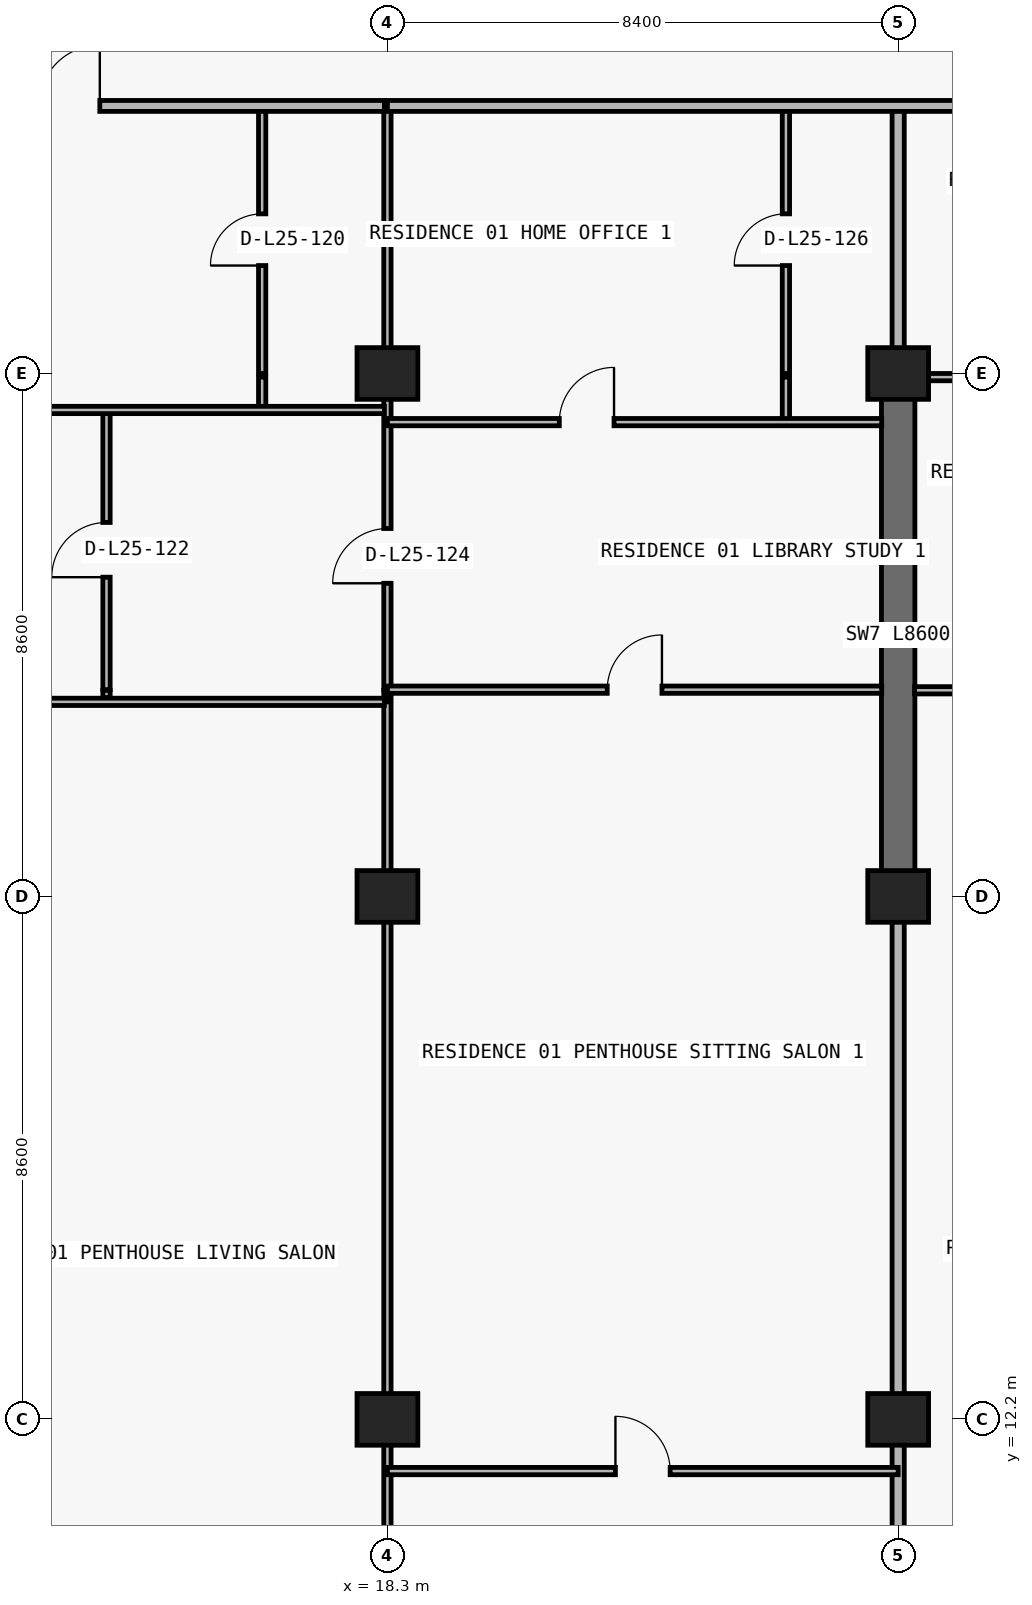
"""IFC4 building model, lengths in metres.
Left out: names, types, materials, properties, quantities, classifications, styles, units other than length and angle.
Written with IfcOpenShell. Run it as: python <this file> out.ifc"""

import sys

from ifc_helpers import new_model, si_unit, direction, frame, frame_2d, origin, origin_2d, place, context, subcontext, project, spatial, rectangle, extrude, element, fill, save


model = new_model("IFC4")
c1 = context("Model", 3, precision=1e-05, world=origin(), true_north=direction((0.0, 1.0)))
c2 = subcontext(c1, "Body", "Model", "MODEL_VIEW")
j1 = project(units=[si_unit("LENGTHUNIT", "METRE"), si_unit("PLANEANGLEUNIT", "RADIAN")], contexts=[c1])
p1 = place(None, origin())
s1 = spatial("IfcSite", under=j1, at=p1, CompositionType="ELEMENT")
p2 = place(p1, origin())
s2 = spatial("IfcBuilding", under=s1, at=p2, CompositionType="ELEMENT")
p3 = place(p2, frame((0.0, 0.0, 94.5)))
s3 = spatial("IfcBuildingStorey", under=s2, at=p3, CompositionType="ELEMENT", Elevation=94.5)
for number, where, z_axis, x_axis in (
    (1, (18.3, 12.2, 0.0), (0.0, 0.0, 1.0), (1.0, 0.0, 0.0)),
    (2, (26.7, 12.2, 0.0), (0.0, 0.0, 1.0), (1.0, 0.0, 0.0)),
    (3, (18.3, 20.8, 0.0), (0.0, 0.0, 1.0), (1.0, 0.0, 0.0)),
    (4, (26.7, 20.8, 0.0), (0.0, 0.0, 1.0), (1.0, 0.0, 0.0)),
    (5, (18.3, 29.4, 0.0), (0.0, 0.0, 1.0), (1.0, 0.0, 0.0)),
    (6, (26.7, 29.4, 0.0), (0.0, 0.0, 1.0), (1.0, 0.0, 0.0)),
):
    element("IfcColumn", number, at=place(p3, frame(where, z_axis=z_axis, x_axis=x_axis)), inside=s3, PredefinedType="COLUMN", context=c2, shape_type="SweptSolid", body=[
        extrude(rectangle(XDim=1.0, YDim=0.85, at=origin_2d()), origin(), (0.0, 0.0, 1.0), 3.0),
    ])
p4 = place(p3, frame((26.7, 20.8, 0.0), z_axis=(0.0, 0.0, 1.0), x_axis=(0.0, 1.0, 0.0)))
e7 = element("IfcWall", 7, at=p4, inside=s3, PredefinedType="SHEAR", context=c2, shape_type="SweptSolid", body=[
    extrude(rectangle(XDim=8.6, YDim=0.55, at=frame_2d((4.3, 0.0))), origin(), (0.0, 0.0, 1.0), 3.0),
])
p5 = place(p3, frame((13.68, 24.07, 0.0), z_axis=(0.0, 0.0, 1.0), x_axis=(0.0, 1.0, 0.0)))
e8 = element("IfcWall", 8, at=p5, inside=s3, PredefinedType="PARTITIONING", context=c2, shape_type="SweptSolid", body=[
    extrude(rectangle(XDim=0.12, YDim=0.12, at=frame_2d((0.06, 0.0))), origin(), (0.0, 0.0, 1.0), 3.0),
])
p6 = place(p3, frame((13.68, 24.2, 0.0), z_axis=(0.0, 0.0, 1.0), x_axis=(0.0, 1.0, 0.0)))
e9 = element("IfcWall", 9, at=p6, inside=s3, PredefinedType="PARTITIONING", context=c2, shape_type="SweptSolid", body=[
    extrude(rectangle(XDim=4.6, YDim=0.12, at=frame_2d((2.3, 0.0))), origin(), (0.0, 0.0, 1.0), 3.0),
])
p7 = place(p6, frame((1.85, 0.0, 0.0)))
e10 = element("IfcOpeningElement", 10, at=p7, cuts=e9, PredefinedType="OPENING", context=c2, shape_type="SweptSolid", body=[
    extrude(rectangle(XDim=0.9, YDim=2.15, at=frame_2d((0.45, 1.075))), frame((0.0, 0.07, 0.0), z_axis=(0.0, -1.0, 0.0), x_axis=(1.0, 0.0, 0.0)), (0.0, 0.0, 1.0), 0.14),
])
p8 = place(p3, frame((16.24, 28.8, 0.0), z_axis=(0.0, 0.0, 1.0), x_axis=(0.0, 1.0, 0.0)))
e11 = element("IfcWall", 11, at=p8, inside=s3, PredefinedType="PARTITIONING", context=c2, shape_type="SweptSolid", body=[
    extrude(rectangle(XDim=0.54, YDim=0.12, at=frame_2d((0.27, 0.0))), origin(), (0.0, 0.0, 1.0), 2.629),
])
p9 = place(p3, frame((16.24, 29.4, 0.0), z_axis=(0.0, 0.0, 1.0), x_axis=(0.0, 1.0, 0.0)))
e12 = element("IfcWall", 12, at=p9, inside=s3, PredefinedType="PARTITIONING", context=c2, shape_type="SweptSolid", body=[
    extrude(rectangle(XDim=4.4, YDim=0.12, at=frame_2d((2.2, 0.0))), origin(), (0.0, 0.0, 1.0), 2.629),
])
p10 = place(p9, frame((1.775, 0.0, 0.0)))
e13 = element("IfcOpeningElement", 13, at=p10, cuts=e12, PredefinedType="OPENING", context=c2, shape_type="SweptSolid", body=[
    extrude(rectangle(XDim=0.85, YDim=2.1, at=frame_2d((0.425, 1.05))), frame((0.0, 0.07, 0.0), z_axis=(0.0, -1.0, 0.0), x_axis=(1.0, 0.0, 0.0)), (0.0, 0.0, 1.0), 0.14),
])
p11 = place(p3, frame((18.3, 8.84, 0.0), z_axis=(0.0, 0.0, 1.0), x_axis=(0.0, 1.0, 0.0)))
e14 = element("IfcWall", 14, at=p11, inside=s3, PredefinedType="PARTITIONING", context=c2, shape_type="SweptSolid", body=[
    extrude(rectangle(XDim=15.16, YDim=0.12, at=frame_2d((7.58, 0.0))), origin(), (0.0, 0.0, 1.0), 2.124),
])
p12 = place(p3, frame((18.3, 24.07, 0.0), z_axis=(0.0, 0.0, 1.0), x_axis=(0.0, 1.0, 0.0)))
e15 = element("IfcWall", 15, at=p12, inside=s3, PredefinedType="PARTITIONING", context=c2, shape_type="SweptSolid", body=[
    extrude(rectangle(XDim=0.12, YDim=0.12, at=frame_2d((0.06, 0.0))), origin(), (0.0, 0.0, 1.0), 2.124),
])
p13 = place(p3, frame((18.3, 24.2, 0.0), z_axis=(0.0, 0.0, 1.0), x_axis=(0.0, 1.0, 0.0)))
e16 = element("IfcWall", 16, at=p13, inside=s3, PredefinedType="PARTITIONING", context=c2, shape_type="SweptSolid", body=[
    extrude(rectangle(XDim=5.14, YDim=0.12, at=frame_2d((2.57, 0.0))), origin(), (0.0, 0.0, 1.0), 2.124),
])
p14 = place(p13, frame((1.75, 0.0, 0.0)))
e17 = element("IfcOpeningElement", 17, at=p14, cuts=e16, PredefinedType="OPENING", context=c2, shape_type="SweptSolid", body=[
    extrude(rectangle(XDim=0.9, YDim=2.074, at=frame_2d((0.45, 1.037))), frame((0.0, 0.07, 0.0), z_axis=(0.0, -1.0, 0.0), x_axis=(1.0, 0.0, 0.0)), (0.0, 0.0, 1.0), 0.14),
])
p15 = place(p3, frame((18.3, 29.4, 0.0), z_axis=(0.0, 0.0, 1.0), x_axis=(0.0, 1.0, 0.0)))
e18 = element("IfcWall", 18, at=p15, inside=s3, PredefinedType="PARTITIONING", context=c2, shape_type="SweptSolid", body=[
    extrude(rectangle(XDim=4.4, YDim=0.12, at=frame_2d((2.2, 0.0))), origin(), (0.0, 0.0, 1.0), 2.124),
])
p16 = place(p3, frame((24.854, 28.6, 0.0), z_axis=(0.0, 0.0, 1.0), x_axis=(0.0, 1.0, 0.0)))
e19 = element("IfcWall", 19, at=p16, inside=s3, PredefinedType="PARTITIONING", context=c2, shape_type="SweptSolid", body=[
    extrude(rectangle(XDim=0.74, YDim=0.12, at=frame_2d((0.37, 0.0))), origin(), (0.0, 0.0, 1.0), 2.629),
])
p17 = place(p3, frame((24.854, 29.4, 0.0), z_axis=(0.0, 0.0, 1.0), x_axis=(0.0, 1.0, 0.0)))
e20 = element("IfcWall", 20, at=p17, inside=s3, PredefinedType="PARTITIONING", context=c2, shape_type="SweptSolid", body=[
    extrude(rectangle(XDim=4.4, YDim=0.12, at=frame_2d((2.2, 0.0))), origin(), (0.0, 0.0, 1.0), 3.0),
])
p18 = place(p17, frame((1.775, 0.0, 0.0)))
e21 = element("IfcOpeningElement", 21, at=p18, cuts=e20, PredefinedType="OPENING", context=c2, shape_type="SweptSolid", body=[
    extrude(rectangle(XDim=0.85, YDim=2.1, at=frame_2d((0.425, 1.05))), frame((0.0, 0.07, 0.0), z_axis=(0.0, -1.0, 0.0), x_axis=(1.0, 0.0, 0.0)), (0.0, 0.0, 1.0), 0.14),
])
p19 = place(p3, frame((26.7, 8.84, 0.0), z_axis=(0.0, 0.0, 1.0), x_axis=(0.0, 1.0, 0.0)))
e22 = element("IfcWall", 22, at=p19, inside=s3, PredefinedType="PARTITIONING", context=c2, shape_type="SweptSolid", body=[
    extrude(rectangle(XDim=11.955, YDim=0.2, at=frame_2d((5.978, 0.0))), origin(), (0.0, 0.0, 1.0), 2.124),
])
p20 = place(p3, frame((26.7, 29.405, 0.0), z_axis=(0.0, 0.0, 1.0), x_axis=(0.0, 1.0, 0.0)))
e23 = element("IfcWall", 23, at=p20, inside=s3, PredefinedType="PARTITIONING", context=c2, shape_type="SweptSolid", body=[
    extrude(rectangle(XDim=4.395, YDim=0.2, at=frame_2d((2.198, 0.0))), origin(), (0.0, 0.0, 1.0), 2.285),
])
p21 = place(p3, frame((18.3, 11.35, 0.0), z_axis=(0.0, 0.0, 1.0), x_axis=(1.0, 0.0, 0.0)))
e24 = element("IfcWall", 24, at=p21, inside=s3, PredefinedType="PARTITIONING", context=c2, shape_type="SweptSolid", body=[
    extrude(rectangle(XDim=8.4, YDim=0.12, at=frame_2d((4.2, 0.0))), origin(), (0.0, 0.0, 1.0), 3.0),
])
p22 = place(p21, frame((3.75, 0.0, 0.0)))
e25 = element("IfcOpeningElement", 25, at=p22, cuts=e24, PredefinedType="OPENING", context=c2, shape_type="SweptSolid", body=[
    extrude(rectangle(XDim=0.9, YDim=2.15, at=frame_2d((0.45, 1.075))), frame((0.0, 0.07, 0.0), z_axis=(0.0, -1.0, 0.0), x_axis=(1.0, 0.0, 0.0)), (0.0, 0.0, 1.0), 0.14),
])
p23 = place(p3, frame((9.9, 24.0, 0.0), z_axis=(0.0, 0.0, 1.0), x_axis=(1.0, 0.0, 0.0)))
e26 = element("IfcWall", 26, at=p23, inside=s3, PredefinedType="PARTITIONING", context=c2, shape_type="SweptSolid", body=[
    extrude(rectangle(XDim=8.35, YDim=0.12, at=frame_2d((4.175, 0.0))), origin(), (0.0, 0.0, 1.0), 3.0),
])
p24 = place(p23, frame((1.44, 0.0, 0.0)))
e27 = element("IfcOpeningElement", 27, at=p24, cuts=e26, PredefinedType="OPENING", context=c2, shape_type="SweptSolid", body=[
    extrude(rectangle(XDim=0.9, YDim=2.15, at=frame_2d((0.45, 1.075))), frame((0.0, 0.07, 0.0), z_axis=(0.0, -1.0, 0.0), x_axis=(1.0, 0.0, 0.0)), (0.0, 0.0, 1.0), 0.14),
])
p25 = place(p3, frame((26.97, 24.19, 0.0), z_axis=(0.0, 0.0, 1.0), x_axis=(1.0, 0.0, 0.0)))
e28 = element("IfcWall", 28, at=p25, inside=s3, PredefinedType="PARTITIONING", context=c2, shape_type="SweptSolid", body=[
    extrude(rectangle(XDim=8.13, YDim=0.12, at=frame_2d((4.065, 0.0))), origin(), (0.0, 0.0, 1.0), 3.0),
])
p26 = place(p25, frame((1.558, 0.0, 0.0)))
e29 = element("IfcOpeningElement", 29, at=p26, cuts=e28, PredefinedType="OPENING", context=c2, shape_type="SweptSolid", body=[
    extrude(rectangle(XDim=0.9, YDim=2.15, at=frame_2d((0.45, 1.075))), frame((0.0, 0.07, 0.0), z_axis=(0.0, -1.0, 0.0), x_axis=(1.0, 0.0, 0.0)), (0.0, 0.0, 1.0), 0.14),
])
p27 = place(p25, frame((5.79, 0.0, 0.0)))
e30 = element("IfcOpeningElement", 30, at=p27, cuts=e28, PredefinedType="OPENING", context=c2, shape_type="SweptSolid", body=[
    extrude(rectangle(XDim=0.9, YDim=2.15, at=frame_2d((0.45, 1.075))), frame((0.0, 0.07, 0.0), z_axis=(0.0, -1.0, 0.0), x_axis=(1.0, 0.0, 0.0)), (0.0, 0.0, 1.0), 0.14),
])
p28 = place(p3, frame((18.3, 24.2, 0.0), z_axis=(0.0, 0.0, 1.0), x_axis=(1.0, 0.0, 0.0)))
e31 = element("IfcWall", 31, at=p28, inside=s3, PredefinedType="PARTITIONING", context=c2, shape_type="SweptSolid", body=[
    extrude(rectangle(XDim=8.13, YDim=0.12, at=frame_2d((4.065, 0.0))), origin(), (0.0, 0.0, 1.0), 3.0),
])
p29 = place(p28, frame((3.615, 0.0, 0.0)))
e32 = element("IfcOpeningElement", 32, at=p29, cuts=e31, PredefinedType="OPENING", context=c2, shape_type="SweptSolid", body=[
    extrude(rectangle(XDim=0.9, YDim=2.15, at=frame_2d((0.45, 1.075))), frame((0.0, 0.07, 0.0), z_axis=(0.0, -1.0, 0.0), x_axis=(1.0, 0.0, 0.0)), (0.0, 0.0, 1.0), 0.14),
])
p30 = place(p3, frame((18.3, 28.6, 0.0), z_axis=(0.0, 0.0, 1.0), x_axis=(1.0, 0.0, 0.0)))
e33 = element("IfcWall", 33, at=p30, inside=s3, PredefinedType="PARTITIONING", context=c2, shape_type="SweptSolid", body=[
    extrude(rectangle(XDim=8.13, YDim=0.12, at=frame_2d((4.065, 0.0))), origin(), (0.0, 0.0, 1.0), 3.0),
])
p31 = place(p30, frame((2.827, 0.0, 0.0)))
e34 = element("IfcOpeningElement", 34, at=p31, cuts=e33, PredefinedType="OPENING", context=c2, shape_type="SweptSolid", body=[
    extrude(rectangle(XDim=0.9, YDim=2.15, at=frame_2d((0.45, 1.075))), frame((0.0, 0.07, 0.0), z_axis=(0.0, -1.0, 0.0), x_axis=(1.0, 0.0, 0.0)), (0.0, 0.0, 1.0), 0.14),
])
p32 = place(p3, frame((9.9, 28.8, 0.0), z_axis=(0.0, 0.0, 1.0), x_axis=(1.0, 0.0, 0.0)))
e35 = element("IfcWall", 35, at=p32, inside=s3, PredefinedType="PARTITIONING", context=c2, shape_type="SweptSolid", body=[
    extrude(rectangle(XDim=8.35, YDim=0.12, at=frame_2d((4.175, 0.0))), origin(), (0.0, 0.0, 1.0), 3.0),
])
p33 = place(p32, frame((1.44, 0.0, 0.0)))
e36 = element("IfcOpeningElement", 36, at=p33, cuts=e35, PredefinedType="OPENING", context=c2, shape_type="SweptSolid", body=[
    extrude(rectangle(XDim=0.9, YDim=2.15, at=frame_2d((0.45, 1.075))), frame((0.0, 0.07, 0.0), z_axis=(0.0, -1.0, 0.0), x_axis=(1.0, 0.0, 0.0)), (0.0, 0.0, 1.0), 0.14),
])
p34 = place(p3, frame((26.97, 29.34, 0.0), z_axis=(0.0, 0.0, 1.0), x_axis=(1.0, 0.0, 0.0)))
e37 = element("IfcWall", 37, at=p34, inside=s3, PredefinedType="PARTITIONING", context=c2, shape_type="SweptSolid", body=[
    extrude(rectangle(XDim=8.13, YDim=0.12, at=frame_2d((4.065, 0.0))), origin(), (0.0, 0.0, 1.0), 2.124),
])
p35 = place(p34, frame((1.558, 0.0, 0.0)))
e38 = element("IfcOpeningElement", 38, at=p35, cuts=e37, PredefinedType="OPENING", context=c2, shape_type="SweptSolid", body=[
    extrude(rectangle(XDim=0.9, YDim=2.074, at=frame_2d((0.45, 1.037))), frame((0.0, 0.07, 0.0), z_axis=(0.0, -1.0, 0.0), x_axis=(1.0, 0.0, 0.0)), (0.0, 0.0, 1.0), 0.14),
])
p36 = place(p3, frame((7.705, 33.8, 0.0), z_axis=(0.0, 0.0, 1.0), x_axis=(1.0, 0.0, 0.0)))
e39 = element("IfcWall", 39, at=p36, inside=s3, PredefinedType="PARTITIONING", context=c2, shape_type="SweptSolid", body=[
    extrude(rectangle(XDim=10.545, YDim=0.18, at=frame_2d((5.272, 0.0))), origin(), (0.0, 0.0, 1.0), 3.0),
])
p37 = place(p36, frame((4.865, 0.0, 0.0)))
e40 = element("IfcOpeningElement", 40, at=p37, cuts=e39, PredefinedType="OPENING", context=c2, shape_type="SweptSolid", body=[
    extrude(rectangle(XDim=1.0, YDim=2.2, at=frame_2d((0.5, 1.1))), frame((0.0, 0.1, 0.0), z_axis=(0.0, -1.0, 0.0), x_axis=(1.0, 0.0, 0.0)), (0.0, 0.0, 1.0), 0.2),
])
p38 = place(p3, frame((18.3, 33.8, 0.0), z_axis=(0.0, 0.0, 1.0), x_axis=(1.0, 0.0, 0.0)))
e41 = element("IfcWall", 41, at=p38, inside=s3, PredefinedType="PARTITIONING", context=c2, shape_type="SweptSolid", body=[
    extrude(rectangle(XDim=41.2, YDim=0.18, at=frame_2d((20.6, 0.0))), origin(), (0.0, 0.0, 1.0), 3.0),
])
p39 = place(p38, frame((10.946, 0.0, 0.0)))
e42 = element("IfcOpeningElement", 42, at=p39, cuts=e41, PredefinedType="OPENING", context=c2, shape_type="SweptSolid", body=[
    extrude(rectangle(XDim=1.0, YDim=2.2, at=frame_2d((0.5, 1.1))), frame((0.0, 0.1, 0.0), z_axis=(0.0, -1.0, 0.0), x_axis=(1.0, 0.0, 0.0)), (0.0, 0.0, 1.0), 0.2),
])
p40 = place(p38, frame((19.113, 0.0, 0.0)))
e43 = element("IfcOpeningElement", 43, at=p40, cuts=e41, PredefinedType="OPENING", context=c2, shape_type="SweptSolid", body=[
    extrude(rectangle(XDim=1.0, YDim=2.2, at=frame_2d((0.5, 1.1))), frame((0.0, 0.1, 0.0), z_axis=(0.0, -1.0, 0.0), x_axis=(1.0, 0.0, 0.0)), (0.0, 0.0, 1.0), 0.2),
])
p41 = place(p38, frame((26.976, 0.0, 0.0)))
e44 = element("IfcOpeningElement", 44, at=p41, cuts=e41, PredefinedType="OPENING", context=c2, shape_type="SweptSolid", body=[
    extrude(rectangle(XDim=1.0, YDim=2.2, at=frame_2d((0.5, 1.1))), frame((0.0, 0.1, 0.0), z_axis=(0.0, -1.0, 0.0), x_axis=(1.0, 0.0, 0.0)), (0.0, 0.0, 1.0), 0.2),
])
p42 = place(p38, frame((35.47, 0.0, 0.0)))
e45 = element("IfcOpeningElement", 45, at=p42, cuts=e41, PredefinedType="OPENING", context=c2, shape_type="SweptSolid", body=[
    extrude(rectangle(XDim=1.0, YDim=2.2, at=frame_2d((0.5, 1.1))), frame((0.0, 0.1, 0.0), z_axis=(0.0, -1.0, 0.0), x_axis=(1.0, 0.0, 0.0)), (0.0, 0.0, 1.0), 0.2),
])
p43 = place(p37, origin())
e46 = element("IfcDoor", 46, at=p43, inside=s3, OperationType="SINGLE_SWING_RIGHT", PredefinedType="DOOR", context=c2, shape_type="SweptSolid", body=[
    extrude(rectangle(XDim=1.0, YDim=2.2, at=frame_2d((0.5, 1.1))), frame((0.0, 0.025, 0.0), z_axis=(0.0, -1.0, 0.0), x_axis=(1.0, 0.0, 0.0)), (0.0, 0.0, 1.0), 0.05),
])
fill(e40, e46)
p44 = place(p10, origin())
e47 = element("IfcDoor", 47, at=p44, inside=s3, OperationType="SINGLE_SWING_LEFT", PredefinedType="DOOR", context=c2, shape_type="SweptSolid", body=[
    extrude(rectangle(XDim=0.85, YDim=2.1, at=frame_2d((0.425, 1.05))), frame((0.0, 0.025, 0.0), z_axis=(0.0, -1.0, 0.0), x_axis=(1.0, 0.0, 0.0)), (0.0, 0.0, 1.0), 0.05),
])
fill(e13, e47)
p45 = place(p7, origin())
e48 = element("IfcDoor", 48, at=p45, inside=s3, OperationType="SINGLE_SWING_LEFT", PredefinedType="DOOR", context=c2, shape_type="SweptSolid", body=[
    extrude(rectangle(XDim=0.9, YDim=2.15, at=frame_2d((0.45, 1.075))), frame((0.0, 0.025, 0.0), z_axis=(0.0, -1.0, 0.0), x_axis=(1.0, 0.0, 0.0)), (0.0, 0.0, 1.0), 0.05),
])
fill(e10, e48)
p46 = place(p14, origin())
e49 = element("IfcDoor", 49, at=p46, inside=s3, OperationType="SINGLE_SWING_LEFT", PredefinedType="DOOR", context=c2, shape_type="SweptSolid", body=[
    extrude(rectangle(XDim=0.9, YDim=2.074, at=frame_2d((0.45, 1.037))), frame((0.0, 0.025, 0.0), z_axis=(0.0, -1.0, 0.0), x_axis=(1.0, 0.0, 0.0)), (0.0, 0.0, 1.0), 0.05),
])
fill(e17, e49)
p47 = place(p31, origin())
e50 = element("IfcDoor", 50, at=p47, inside=s3, OperationType="SINGLE_SWING_RIGHT", PredefinedType="DOOR", context=c2, shape_type="SweptSolid", body=[
    extrude(rectangle(XDim=0.9, YDim=2.15, at=frame_2d((0.45, 1.075))), frame((0.0, 0.025, 0.0), z_axis=(0.0, -1.0, 0.0), x_axis=(1.0, 0.0, 0.0)), (0.0, 0.0, 1.0), 0.05),
])
fill(e34, e50)
p48 = place(p18, origin())
e51 = element("IfcDoor", 51, at=p48, inside=s3, OperationType="SINGLE_SWING_LEFT", PredefinedType="DOOR", context=c2, shape_type="SweptSolid", body=[
    extrude(rectangle(XDim=0.85, YDim=2.1, at=frame_2d((0.425, 1.05))), frame((0.0, 0.025, 0.0), z_axis=(0.0, -1.0, 0.0), x_axis=(1.0, 0.0, 0.0)), (0.0, 0.0, 1.0), 0.05),
])
fill(e21, e51)
p49 = place(p29, origin())
e52 = element("IfcDoor", 52, at=p49, inside=s3, OperationType="SINGLE_SWING_RIGHT", PredefinedType="DOOR", context=c2, shape_type="SweptSolid", body=[
    extrude(rectangle(XDim=0.9, YDim=2.15, at=frame_2d((0.45, 1.075))), frame((0.0, 0.025, 0.0), z_axis=(0.0, -1.0, 0.0), x_axis=(1.0, 0.0, 0.0)), (0.0, 0.0, 1.0), 0.05),
])
fill(e32, e52)
p50 = place(p22, origin())
e53 = element("IfcDoor", 53, at=p50, inside=s3, OperationType="SINGLE_SWING_LEFT", PredefinedType="DOOR", context=c2, shape_type="SweptSolid", body=[
    extrude(rectangle(XDim=0.9, YDim=2.15, at=frame_2d((0.45, 1.075))), frame((0.0, 0.025, 0.0), z_axis=(0.0, -1.0, 0.0), x_axis=(1.0, 0.0, 0.0)), (0.0, 0.0, 1.0), 0.05),
])
fill(e25, e53)
save(model, sys.argv[1])
